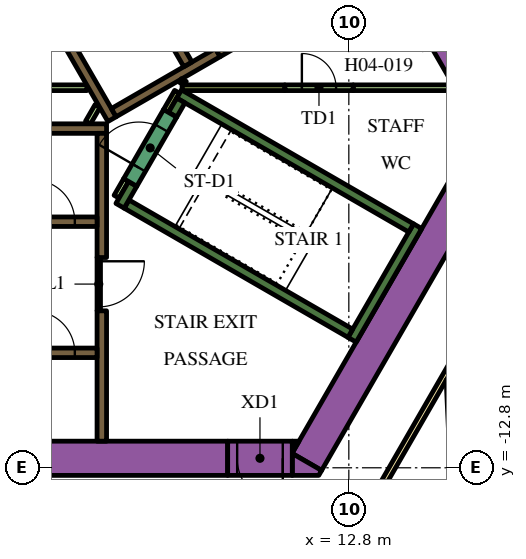
"""IFC4 building model, lengths in metres.
Left out: names, types, materials, properties, quantities, classifications, styles, units other than length and angle.
Written with IfcOpenShell. Run it as: python <this file> out.ifc"""

import sys

from ifc_helpers import new_model, si_unit, direction, frame, frame_2d, origin, place, context, subcontext, project, spatial, polyline, rectangle, outline, extrude, element, fill, save


model = new_model("IFC4")
c1 = context("Model", 3, precision=1e-05, world=origin(), true_north=direction((0.0, 1.0)))
c2 = subcontext(c1, "Body", "Model", "MODEL_VIEW")
j1 = project(units=[si_unit("LENGTHUNIT", "METRE"), si_unit("PLANEANGLEUNIT", "RADIAN")], contexts=[c1])
p1 = place(None, origin())
s1 = spatial("IfcSite", under=j1, at=p1, CompositionType="ELEMENT")
p2 = place(p1, origin())
s2 = spatial("IfcBuilding", under=s1, at=p2, CompositionType="ELEMENT")
p3 = place(p2, frame((0.0, 0.0, 62.7)))
s3 = spatial("IfcBuildingStorey", under=s2, at=p3, CompositionType="ELEMENT", Elevation=62.7)
p4 = place(p3, frame((6.776, 13.364, 0.0), z_axis=(0.0, 0.0, 1.0), x_axis=(0.500004177138, -0.8660229921, 0.0)))
e1 = element("IfcWall", 1, at=p4, inside=s3, PredefinedType="SOLIDWALL", context=c2, shape_type="SweptSolid", body=[
    extrude(rectangle(XDim=20.204, YDim=0.9, at=frame_2d((10.102, 0.0))), origin(), (0.0, 0.0, 1.0), 3.9),
])
p5 = place(p3, frame((11.695, -12.644, 0.0), z_axis=(0.0, 0.0, 1.0), x_axis=(0.500010229568, 0.86601949766, 0.0)))
e2 = element("IfcWall", 2, at=p5, inside=s3, PredefinedType="SOLIDWALL", context=c2, shape_type="SweptSolid", body=[
    extrude(rectangle(XDim=9.326, YDim=0.9, at=frame_2d((4.663, 0.0))), origin(), (0.0, 0.0, 1.0), 3.9),
])
p6 = place(p3, origin())
e3 = element("IfcWall", 3, at=p6, inside=s3, PredefinedType="SOLIDWALL", context=c2, shape_type="SweptSolid", body=[
    extrude(outline(polyline([(12.009, -13.0), (11.312, -13.0), (11.312, -12.425), (12.083, -12.871), (12.009, -13.0)])), origin(), (0.0, 0.0, 1.0), 3.9),
])
e4 = element("IfcWall", 4, at=p6, inside=s3, PredefinedType="SOLIDWALL", context=c2, shape_type="SweptSolid", body=[
    extrude(outline(polyline([(11.489, -12.1), (11.312, -12.407), (11.312, -12.1), (11.489, -12.1)])), origin(), (0.0, 0.0, 1.0), 3.9),
])
p7 = place(p3, frame((-12.019, -12.55, 0.0), z_axis=(0.0, 0.0, 1.0), x_axis=(1.0, 0.0, 0.0)))
e5 = element("IfcWall", 5, at=p7, inside=s3, PredefinedType="SOLIDWALL", context=c2, shape_type="SweptSolid", body=[
    extrude(rectangle(XDim=21.63, YDim=0.9, at=frame_2d((10.815, 0.0))), origin(), (0.0, 0.0, 1.0), 3.9),
])
p8 = place(p3, frame((12.885, -9.431, 0.0), z_axis=(0.0, 0.0, 1.0), x_axis=(0.500020560727, 0.866013532718, 0.0)))
e6 = element("IfcWall", 6, at=p8, inside=s3, PredefinedType="SOLIDWALL", context=c2, shape_type="SweptSolid", body=[
    extrude(rectangle(XDim=3.45, YDim=0.25, at=frame_2d((1.725, 0.0))), origin(), (0.0, 0.0, 1.0), 3.9),
])
p9 = place(p3, frame((12.84, -9.261, 0.0), z_axis=(0.0, 0.0, 1.0), x_axis=(-0.866013990052, 0.500019768644, 0.0)))
e7 = element("IfcWall", 7, at=p9, inside=s3, PredefinedType="SOLIDWALL", context=c2, shape_type="SweptSolid", body=[
    extrude(rectangle(XDim=6.8, YDim=0.25, at=frame_2d((3.4, 0.0))), origin(), (0.0, 0.0, 1.0), 3.9),
])
p10 = place(p3, frame((7.113, -5.33, 0.0), z_axis=(0.0, 0.0, 1.0), x_axis=(-0.499965889992, -0.866045096311, 0.0)))
e8 = element("IfcWall", 8, at=p10, inside=s3, PredefinedType="SOLIDWALL", context=c2, shape_type="SweptSolid", body=[
    extrude(rectangle(XDim=0.666, YDim=0.25, at=frame_2d((0.333, 0.0))), origin(), (0.0, 0.0, 1.0), 3.9),
])
p11 = place(p3, frame((8.334, -2.964, 0.0), z_axis=(0.0, 0.0, 1.0), x_axis=(0.866016039709, -0.500016218704, 0.0)))
e9 = element("IfcWall", 9, at=p11, inside=s3, PredefinedType="SOLIDWALL", context=c2, shape_type="SweptSolid", body=[
    extrude(rectangle(XDim=7.05, YDim=0.25, at=frame_2d((3.525, 0.0))), origin(), (0.0, 0.0, 1.0), 3.9),
])
p12 = place(p3, frame((8.163, -3.511, 0.0), z_axis=(0.0, 0.0, 1.0), x_axis=(0.500127794843, 0.865951608824, 0.0)))
e10 = element("IfcWall", 10, at=p12, inside=s3, PredefinedType="SOLIDWALL", context=c2, shape_type="SweptSolid", body=[
    extrude(rectangle(XDim=0.435, YDim=0.25, at=frame_2d((0.217, 0.0))), origin(), (0.0, 0.0, 1.0), 3.9),
])
p13 = place(p3, frame((-6.19, -3.875, 0.0), z_axis=(0.0, 0.0, 1.0), x_axis=(1.0, 0.0, 0.0)))
e11 = element("IfcWall", 11, at=p13, inside=s3, PredefinedType="SOLIDWALL", context=c2, shape_type="SweptSolid", body=[
    extrude(rectangle(XDim=12.615, YDim=0.25, at=frame_2d((6.307, 0.0))), origin(), (0.0, 0.0, 1.0), 3.9),
])
p14 = place(p3, frame((6.3, -8.67, 0.0), z_axis=(0.0, 0.0, 1.0), x_axis=(0.0, -1.0, 0.0)))
e12 = element("IfcWall", 12, at=p14, inside=s3, PredefinedType="SOLIDWALL", context=c2, shape_type="SweptSolid", body=[
    extrude(rectangle(XDim=3.43, YDim=0.25, at=frame_2d((1.715, 0.0))), origin(), (0.0, 0.0, 1.0), 3.9),
])
p15 = place(p3, frame((6.3, -7.268, 0.0), z_axis=(0.0, 0.0, 1.0), x_axis=(0.0, 1.0, 0.0)))
e13 = element("IfcWall", 13, at=p15, inside=s3, PredefinedType="SOLIDWALL", context=c2, shape_type="SweptSolid", body=[
    extrude(rectangle(XDim=3.268, YDim=0.25, at=frame_2d((1.634, 0.0))), origin(), (0.0, 0.0, 1.0), 3.9),
])
e14 = element("IfcWall", 14, at=p6, inside=s3, PredefinedType="SOLIDWALL", context=c2, shape_type="SweptSolid", body=[
    extrude(outline(polyline([(0.335, 6.925), (0.335, 6.925), (0.335, 7.075), (0.335, 7.075), (0.335, 7.075), (0.245, 7.075), (0.079, 7.363), (0.035, 7.439), (0.252, 7.564), (0.377, 7.348), (6.552, -3.348), (6.677, -3.564), (6.46, -3.689), (4.897, -0.981), (0.332, 6.925), (0.335, 6.925), (0.335, 6.925)])), origin(), (0.0, 0.0, 1.0), 3.9),
])
p16 = place(p3, frame((9.352, -1.875, 0.0), z_axis=(0.0, 0.0, 1.0), x_axis=(-0.866024844342, -0.500000968981, 0.0)))
e15 = element("IfcWall", 15, at=p16, inside=s3, PredefinedType="SOLIDWALL", context=c2, shape_type="SweptSolid", body=[
    extrude(rectangle(XDim=3.162, YDim=0.25, at=frame_2d((1.581, 0.0))), origin(), (0.0, 0.0, 1.0), 3.9),
])
p17 = place(p3, frame((6.688, -5.667, 0.0), z_axis=(0.0, 0.0, 1.0), x_axis=(0.499834152157, 0.86612113491, 0.0)))
e16 = element("IfcWall", 16, at=p17, inside=s3, PredefinedType="PARTITIONING", context=c2, shape_type="SweptSolid", body=[
    extrude(rectangle(XDim=0.505, YDim=0.15, at=frame_2d((0.252, 0.0))), origin(), (0.0, 0.0, 1.0), 2.75),
])
p18 = place(p3, frame((5.936, -3.718, 0.0), z_axis=(0.0, 0.0, 1.0), x_axis=(0.499890179513, 0.866088799389, 0.0)))
e17 = element("IfcWall", 17, at=p18, inside=s3, PredefinedType="PARTITIONING", context=c2, shape_type="SweptSolid", body=[
    extrude(rectangle(XDim=0.504, YDim=0.15, at=frame_2d((0.252, 0.0))), origin(), (0.0, 0.0, 1.0), 2.75),
])
p19 = place(p3, frame((8.412, -2.8, 0.0), z_axis=(0.0, 0.0, 1.0), x_axis=(1.0, 0.0, 0.0)))
e18 = element("IfcWall", 18, at=p19, inside=s3, PredefinedType="PARTITIONING", context=c2, shape_type="SweptSolid", body=[
    extrude(rectangle(XDim=2.702, YDim=0.15, at=frame_2d((1.351, 0.0))), origin(), (0.0, 0.0, 1.0), 3.9),
])
p20 = place(p3, frame((8.459, -2.599, 0.0), z_axis=(0.0, 0.0, 1.0), x_axis=(-0.501919277433, -0.864914469148, 0.0)))
e19 = element("IfcWall", 19, at=p20, inside=s3, PredefinedType="PARTITIONING", context=c2, shape_type="SweptSolid", body=[
    extrude(rectangle(XDim=0.109, YDim=0.15, at=frame_2d((0.054, 0.0))), origin(), (0.0, 0.0, 1.0), 3.9),
])
p21 = place(p3, frame((8.281, -2.907, 0.0), z_axis=(0.0, 0.0, 1.0), x_axis=(-0.500193841991, -0.86591346013, 0.0)))
e20 = element("IfcWall", 20, at=p21, inside=s3, PredefinedType="PARTITIONING", context=c2, shape_type="SweptSolid", body=[
    extrude(rectangle(XDim=0.583, YDim=0.15, at=frame_2d((0.292, 0.0))), origin(), (0.0, 0.0, 1.0), 3.9),
])
p22 = place(p3, frame((3.238, -2.8, 0.0), z_axis=(0.0, 0.0, 1.0), x_axis=(1.0, 0.0, 0.0)))
e21 = element("IfcWall", 21, at=p22, inside=s3, PredefinedType="PARTITIONING", context=c2, shape_type="SweptSolid", body=[
    extrude(rectangle(XDim=2.672, YDim=0.15, at=frame_2d((1.336, 0.0))), origin(), (0.0, 0.0, 1.0), 2.75),
])
p23 = place(p3, frame((12.915, -2.8, 0.0), z_axis=(0.0, 0.0, 1.0), x_axis=(1.0, 0.0, 0.0)))
e22 = element("IfcWall", 22, at=p23, inside=s3, PredefinedType="PARTITIONING", context=c2, shape_type="SweptSolid", body=[
    extrude(rectangle(XDim=2.637, YDim=0.15, at=frame_2d((1.318, 0.0))), origin(), (0.0, 0.0, 1.0), 2.75),
])
p24 = place(p3, frame((-6.175, -9.775, 0.0), z_axis=(0.0, 0.0, 1.0), x_axis=(1.0, 0.0, 0.0)))
e23 = element("IfcWall", 23, at=p24, inside=s3, PredefinedType="SOLIDWALL", context=c2, shape_type="SweptSolid", body=[
    extrude(rectangle(XDim=12.35, YDim=0.25, at=frame_2d((6.175, 0.0))), origin(), (0.0, 0.0, 1.0), 3.9),
])
p25 = place(p24, frame((0.585, 0.0, 0.0)))
e24 = element("IfcOpeningElement", 24, at=p25, cuts=e23, PredefinedType="OPENING", context=c2, shape_type="SweptSolid", body=[
    extrude(rectangle(XDim=1.1, YDim=2.1, at=frame_2d((0.55, 1.05))), frame((0.0, 0.135, 0.0), z_axis=(0.0, -1.0, 0.0), x_axis=(1.0, 0.0, 0.0)), (0.0, 0.0, 1.0), 0.27),
])
p26 = place(p24, frame((3.105, 0.0, 0.0)))
e25 = element("IfcOpeningElement", 25, at=p26, cuts=e23, PredefinedType="OPENING", context=c2, shape_type="SweptSolid", body=[
    extrude(rectangle(XDim=1.1, YDim=2.1, at=frame_2d((0.55, 1.05))), frame((0.0, 0.135, 0.0), z_axis=(0.0, -1.0, 0.0), x_axis=(1.0, 0.0, 0.0)), (0.0, 0.0, 1.0), 0.27),
])
p27 = place(p24, frame((5.625, 0.0, 0.0)))
e26 = element("IfcOpeningElement", 26, at=p27, cuts=e23, PredefinedType="OPENING", context=c2, shape_type="SweptSolid", body=[
    extrude(rectangle(XDim=1.1, YDim=2.1, at=frame_2d((0.55, 1.05))), frame((0.0, 0.135, 0.0), z_axis=(0.0, -1.0, 0.0), x_axis=(1.0, 0.0, 0.0)), (0.0, 0.0, 1.0), 0.27),
])
p28 = place(p24, frame((8.145, 0.0, 0.0)))
e27 = element("IfcOpeningElement", 27, at=p28, cuts=e23, PredefinedType="OPENING", context=c2, shape_type="SweptSolid", body=[
    extrude(rectangle(XDim=1.1, YDim=2.1, at=frame_2d((0.55, 1.05))), frame((0.0, 0.135, 0.0), z_axis=(0.0, -1.0, 0.0), x_axis=(1.0, 0.0, 0.0)), (0.0, 0.0, 1.0), 0.27),
])
p29 = place(p24, frame((10.665, 0.0, 0.0)))
e28 = element("IfcOpeningElement", 28, at=p29, cuts=e23, PredefinedType="OPENING", context=c2, shape_type="SweptSolid", body=[
    extrude(rectangle(XDim=1.1, YDim=2.1, at=frame_2d((0.55, 1.05))), frame((0.0, 0.135, 0.0), z_axis=(0.0, -1.0, 0.0), x_axis=(1.0, 0.0, 0.0)), (0.0, 0.0, 1.0), 0.27),
])
p30 = place(p3, frame((-6.175, -6.325, 0.0), z_axis=(0.0, 0.0, 1.0), x_axis=(1.0, 0.0, 0.0)))
e29 = element("IfcWall", 29, at=p30, inside=s3, PredefinedType="SOLIDWALL", context=c2, shape_type="SweptSolid", body=[
    extrude(rectangle(XDim=12.35, YDim=0.25, at=frame_2d((6.175, 0.0))), origin(), (0.0, 0.0, 1.0), 3.9),
])
p31 = place(p30, frame((3.205, 0.0, 0.0)))
e30 = element("IfcOpeningElement", 30, at=p31, cuts=e29, PredefinedType="OPENING", context=c2, shape_type="SweptSolid", body=[
    extrude(rectangle(XDim=0.9, YDim=2.1, at=frame_2d((0.45, 1.05))), frame((0.0, 0.135, 0.0), z_axis=(0.0, -1.0, 0.0), x_axis=(1.0, 0.0, 0.0)), (0.0, 0.0, 1.0), 0.27),
])
p32 = place(p30, frame((8.145, 0.0, 0.0)))
e31 = element("IfcOpeningElement", 31, at=p32, cuts=e29, PredefinedType="OPENING", context=c2, shape_type="SweptSolid", body=[
    extrude(rectangle(XDim=1.1, YDim=2.1, at=frame_2d((0.55, 1.05))), frame((0.0, 0.135, 0.0), z_axis=(0.0, -1.0, 0.0), x_axis=(1.0, 0.0, 0.0)), (0.0, 0.0, 1.0), 0.27),
])
p33 = place(p30, frame((10.665, 0.0, 0.0)))
e32 = element("IfcOpeningElement", 32, at=p33, cuts=e29, PredefinedType="OPENING", context=c2, shape_type="SweptSolid", body=[
    extrude(rectangle(XDim=1.1, YDim=2.1, at=frame_2d((0.55, 1.05))), frame((0.0, 0.135, 0.0), z_axis=(0.0, -1.0, 0.0), x_axis=(1.0, 0.0, 0.0)), (0.0, 0.0, 1.0), 0.27),
])
p34 = place(p3, frame((8.565, -2.185, 0.0), z_axis=(0.0, 0.0, 1.0), x_axis=(-0.499997954832, 0.866026584559, 0.0)))
e33 = element("IfcWall", 33, at=p34, inside=s3, PredefinedType="SOLIDWALL", context=c2, shape_type="SweptSolid", body=[
    extrude(rectangle(XDim=12.35, YDim=0.25, at=frame_2d((6.175, 0.0))), origin(), (0.0, 0.0, 1.0), 3.9),
])
p35 = place(p34, frame((5.725, 0.0, 0.0)))
e34 = element("IfcOpeningElement", 34, at=p35, cuts=e33, PredefinedType="OPENING", context=c2, shape_type="SweptSolid", body=[
    extrude(rectangle(XDim=0.9, YDim=2.1, at=frame_2d((0.45, 1.05))), frame((0.0, 0.135, 0.0), z_axis=(0.0, -1.0, 0.0), x_axis=(1.0, 0.0, 0.0)), (0.0, 0.0, 1.0), 0.27),
])
p36 = place(p3, frame((7.048, -5.292, 0.0), z_axis=(0.0, 0.0, 1.0), x_axis=(0.49994051562, 0.866059744384, 0.0)))
e35 = element("IfcWall", 35, at=p36, inside=s3, PredefinedType="SOLIDWALL", context=c2, shape_type="SweptSolid", body=[
    extrude(rectangle(XDim=2.1, YDim=0.4, at=frame_2d((1.05, 0.0))), origin(), (0.0, 0.0, 1.0), 3.9),
])
p37 = place(p36, frame((0.45, 0.0, 0.0)))
e36 = element("IfcOpeningElement", 36, at=p37, cuts=e35, PredefinedType="OPENING", context=c2, shape_type="SweptSolid", body=[
    extrude(rectangle(XDim=1.2, YDim=2.1, at=frame_2d((0.6, 1.05))), frame((0.0, 0.21, 0.0), z_axis=(0.0, -1.0, 0.0), x_axis=(1.0, 0.0, 0.0)), (0.0, 0.0, 1.0), 0.42),
])
p38 = place(p3, frame((6.22, -7.266, 0.0), z_axis=(0.0, 0.0, 1.0), x_axis=(0.0, -1.0, 0.0)))
e37 = element("IfcWall", 37, at=p38, inside=s3, PredefinedType="PARTITIONING", context=c2, shape_type="SweptSolid", body=[
    extrude(rectangle(XDim=1.4, YDim=0.09, at=frame_2d((0.7, 0.0))), origin(), (0.0, 0.0, 1.0), 2.75),
])
p39 = place(p38, frame((0.1, 0.0, 0.0)))
e38 = element("IfcOpeningElement", 38, at=p39, cuts=e37, PredefinedType="OPENING", context=c2, shape_type="SweptSolid", body=[
    extrude(rectangle(XDim=1.2, YDim=2.1, at=frame_2d((0.6, 1.05))), frame((0.0, 0.055, 0.0), z_axis=(0.0, -1.0, 0.0), x_axis=(1.0, 0.0, 0.0)), (0.0, 0.0, 1.0), 0.11),
])
p40 = place(p3, frame((11.312, -12.55, 0.0), z_axis=(0.0, 0.0, 1.0), x_axis=(-1.0, 0.0, 0.0)))
e39 = element("IfcWall", 39, at=p40, inside=s3, PredefinedType="SOLIDWALL", context=c2, shape_type="SweptSolid", body=[
    extrude(rectangle(XDim=1.7, YDim=0.9, at=frame_2d((0.85, 0.0))), origin(), (0.0, 0.0, 1.0), 3.9),
])
p41 = place(p40, frame((0.25, 0.0, 0.0)))
e40 = element("IfcOpeningElement", 40, at=p41, cuts=e39, PredefinedType="OPENING", context=c2, shape_type="SweptSolid", body=[
    extrude(rectangle(XDim=1.2, YDim=2.1, at=frame_2d((0.6, 1.05))), frame((0.0, 0.46, 0.0), z_axis=(0.0, -1.0, 0.0), x_axis=(1.0, 0.0, 0.0)), (0.0, 0.0, 1.0), 0.92),
])
p42 = place(p3, frame((9.352, -1.875, 0.0), z_axis=(0.0, 0.0, 1.0), x_axis=(0.865989075817, 0.500062916607, 0.0)))
e41 = element("IfcWall", 41, at=p42, inside=s3, PredefinedType="SOLIDWALL", context=c2, shape_type="SweptSolid", body=[
    extrude(rectangle(XDim=1.8, YDim=0.25, at=frame_2d((0.9, 0.0))), origin(), (0.0, 0.0, 1.0), 3.9),
])
p43 = place(p42, frame((0.45, 0.0, 0.0)))
e42 = element("IfcOpeningElement", 42, at=p43, cuts=e41, PredefinedType="OPENING", context=c2, shape_type="SweptSolid", body=[
    extrude(rectangle(XDim=0.9, YDim=2.1, at=frame_2d((0.45, 1.05))), frame((0.0, 0.135, 0.0), z_axis=(0.0, -1.0, 0.0), x_axis=(1.0, 0.0, 0.0)), (0.0, 0.0, 1.0), 0.27),
])
p44 = place(p3, frame((11.115, -2.8, 0.0), z_axis=(0.0, 0.0, 1.0), x_axis=(1.0, 0.0, 0.0)))
e43 = element("IfcWall", 43, at=p44, inside=s3, PredefinedType="PARTITIONING", context=c2, shape_type="SweptSolid", body=[
    extrude(rectangle(XDim=1.8, YDim=0.15, at=frame_2d((0.9, 0.0))), origin(), (0.0, 0.0, 1.0), 2.75),
])
p45 = place(p44, frame((0.45, 0.0, 0.0)))
e44 = element("IfcOpeningElement", 44, at=p45, cuts=e43, PredefinedType="OPENING", context=c2, shape_type="SweptSolid", body=[
    extrude(rectangle(XDim=0.9, YDim=2.1, at=frame_2d((0.45, 1.05))), frame((0.0, 0.085, 0.0), z_axis=(0.0, -1.0, 0.0), x_axis=(1.0, 0.0, 0.0)), (0.0, 0.0, 1.0), 0.17),
])
p46 = place(p3, frame((6.163, 18.475, 0.0), z_axis=(0.0, 0.0, 1.0), x_axis=(0.500001317485, -0.866024643133, 0.0)))
e45 = element("IfcWall", 45, at=p46, inside=s3, PredefinedType="PARTITIONING", context=c2, shape_type="SweptSolid", body=[
    extrude(rectangle(XDim=25.767, YDim=0.15, at=frame_2d((12.883, 0.0))), origin(), (0.0, 0.0, 1.0), 2.75),
])
p47 = place(p46, frame((21.138, 0.0, 0.0)))
e46 = element("IfcOpeningElement", 46, at=p47, cuts=e45, PredefinedType="OPENING", context=c2, shape_type="SweptSolid", body=[
    extrude(rectangle(XDim=1.0, YDim=2.1, at=frame_2d((0.5, 1.05))), frame((0.0, 0.085, 0.0), z_axis=(0.0, -1.0, 0.0), x_axis=(1.0, 0.0, 0.0)), (0.0, 0.0, 1.0), 0.17),
])
p48 = place(p46, frame((9.948, 0.0, 0.0)))
e47 = element("IfcOpeningElement", 47, at=p48, cuts=e45, PredefinedType="OPENING", context=c2, shape_type="SweptSolid", body=[
    extrude(rectangle(XDim=1.1, YDim=2.1, at=frame_2d((0.55, 1.05))), frame((0.0, 0.085, 0.0), z_axis=(0.0, -1.0, 0.0), x_axis=(1.0, 0.0, 0.0)), (0.0, 0.0, 1.0), 0.17),
])
p49 = place(p46, frame((8.641, 0.0, 0.0)))
e48 = element("IfcOpeningElement", 48, at=p49, cuts=e45, PredefinedType="OPENING", context=c2, shape_type="SweptSolid", body=[
    extrude(rectangle(XDim=1.0, YDim=2.1, at=frame_2d((0.5, 1.05))), frame((0.0, 0.085, 0.0), z_axis=(0.0, -1.0, 0.0), x_axis=(1.0, 0.0, 0.0)), (0.0, 0.0, 1.0), 0.17),
])
p50 = place(p46, frame((0.18, 0.0, 0.0)))
e49 = element("IfcOpeningElement", 49, at=p50, cuts=e45, PredefinedType="OPENING", context=c2, shape_type="SweptSolid", body=[
    extrude(rectangle(XDim=1.0, YDim=2.1, at=frame_2d((0.5, 1.05))), frame((0.0, 0.085, 0.0), z_axis=(0.0, -1.0, 0.0), x_axis=(1.0, 0.0, 0.0)), (0.0, 0.0, 1.0), 0.17),
])
p51 = place(p3, frame((15.587, -9.952, 0.0), z_axis=(0.0, 0.0, 1.0), x_axis=(-0.500016618951, -0.866015808616, 0.0)))
e50 = element("IfcWall", 50, at=p51, inside=s3, PredefinedType="PARTITIONING", context=c2, shape_type="SweptSolid", body=[
    extrude(rectangle(XDim=5.268, YDim=0.15, at=frame_2d((2.634, 0.0))), origin(), (0.0, 0.0, 1.0), 2.75),
])
p52 = place(p3, frame((15.973, -22.109, 0.0), z_axis=(0.0, 0.0, 1.0), x_axis=(-0.046191717129, 0.998932592955, 0.0)))
e51 = element("IfcWall", 51, at=p52, inside=s3, PredefinedType="PARTITIONING", context=c2, shape_type="SweptSolid", body=[
    extrude(rectangle(XDim=11.638, YDim=0.15, at=frame_2d((5.819, 0.0))), origin(), (0.0, 0.0, 1.0), 2.75),
])
p53 = place(p29, origin())
e52 = element("IfcDoor", 52, at=p53, inside=s3, OperationType="DOUBLE_DOOR_SLIDING", PredefinedType="DOOR", context=c2, shape_type="SweptSolid", body=[
    extrude(rectangle(XDim=1.1, YDim=2.1, at=frame_2d((0.55, 1.05))), frame((0.0, 0.025, 0.0), z_axis=(0.0, -1.0, 0.0), x_axis=(1.0, 0.0, 0.0)), (0.0, 0.0, 1.0), 0.05),
])
fill(e28, e52)
p54 = place(p33, origin())
e53 = element("IfcDoor", 53, at=p54, inside=s3, OperationType="DOUBLE_DOOR_SLIDING", PredefinedType="DOOR", context=c2, shape_type="SweptSolid", body=[
    extrude(rectangle(XDim=1.1, YDim=2.1, at=frame_2d((0.55, 1.05))), frame((0.0, 0.025, 0.0), z_axis=(0.0, -1.0, 0.0), x_axis=(1.0, 0.0, 0.0)), (0.0, 0.0, 1.0), 0.05),
])
fill(e32, e53)
p55 = place(p37, origin())
e54 = element("IfcDoor", 54, at=p55, inside=s3, OperationType="SINGLE_SWING_LEFT", PredefinedType="DOOR", context=c2, shape_type="SweptSolid", body=[
    extrude(rectangle(XDim=1.2, YDim=2.1, at=frame_2d((0.6, 1.05))), frame((0.0, 0.025, 0.0), z_axis=(0.0, -1.0, 0.0), x_axis=(1.0, 0.0, 0.0)), (0.0, 0.0, 1.0), 0.05),
])
fill(e36, e54)
p56 = place(p39, origin())
e55 = element("IfcDoor", 55, at=p56, inside=s3, OperationType="SINGLE_SWING_LEFT", PredefinedType="DOOR", context=c2, shape_type="SweptSolid", body=[
    extrude(rectangle(XDim=1.2, YDim=2.1, at=frame_2d((0.6, 1.05))), frame((0.0, 0.025, 0.0), z_axis=(0.0, -1.0, 0.0), x_axis=(1.0, 0.0, 0.0)), (0.0, 0.0, 1.0), 0.05),
])
fill(e38, e55)
p57 = place(p41, origin())
e56 = element("IfcDoor", 56, at=p57, inside=s3, OperationType="SINGLE_SWING_LEFT", PredefinedType="DOOR", context=c2, shape_type="SweptSolid", body=[
    extrude(rectangle(XDim=1.2, YDim=2.1, at=frame_2d((0.6, 1.05))), frame((0.0, 0.025, 0.0), z_axis=(0.0, -1.0, 0.0), x_axis=(1.0, 0.0, 0.0)), (0.0, 0.0, 1.0), 0.05),
])
fill(e40, e56)
p58 = place(p45, origin())
e57 = element("IfcDoor", 57, at=p58, inside=s3, OperationType="SINGLE_SWING_LEFT", PredefinedType="DOOR", context=c2, shape_type="SweptSolid", body=[
    extrude(rectangle(XDim=0.9, YDim=2.1, at=frame_2d((0.45, 1.05))), frame((0.0, 0.025, 0.0), z_axis=(0.0, -1.0, 0.0), x_axis=(1.0, 0.0, 0.0)), (0.0, 0.0, 1.0), 0.05),
])
fill(e44, e57)
save(model, sys.argv[1])
